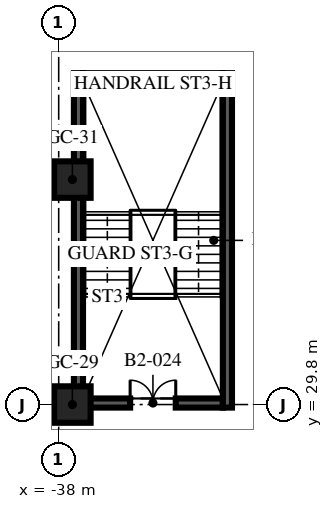
"""IFC4 building model, lengths in metres.
Left out: names, types, materials, properties, quantities, classifications, styles, units other than length and angle.
Written with IfcOpenShell. Run it as: python <this file> out.ifc"""

import sys

from ifc_helpers import new_model, si_unit, direction, frame, frame_2d, origin, origin_2d, place, context, subcontext, project, spatial, rectangle, extrude, element, fill, save


model = new_model("IFC4")
c1 = context("Model", 3, precision=1e-05, world=origin(), true_north=direction((0.0, 1.0)))
c2 = subcontext(c1, "Body", "Model", "MODEL_VIEW")
j1 = project(units=[si_unit("LENGTHUNIT", "METRE"), si_unit("PLANEANGLEUNIT", "RADIAN")], contexts=[c1])
p1 = place(None, origin())
s1 = spatial("IfcSite", under=j1, at=p1, CompositionType="ELEMENT")
p2 = place(p1, origin())
s2 = spatial("IfcBuilding", under=s1, at=p2, CompositionType="ELEMENT")
p3 = place(p2, frame((0.0, 0.0, -9.0)))
s3 = spatial("IfcBuildingStorey", under=s2, at=p3, CompositionType="ELEMENT", Elevation=-9.0)
for number, where, z_axis, x_axis in (
    (1, (-37.55, 29.8, 0.0), (0.0, 0.0, 1.0), (1.0, 0.0, 0.0)),
    (2, (-37.55, 37.2, 0.0), (0.0, 0.0, 1.0), (1.0, 0.0, 0.0)),
):
    element("IfcColumn", number, at=place(p3, frame(where, z_axis=z_axis, x_axis=x_axis)), inside=s3, PredefinedType="COLUMN", context=c2, shape_type="SweptSolid", body=[
        extrude(rectangle(XDim=1.2, YDim=1.2, at=origin_2d()), origin(), (0.0, 0.0, 1.0), 3.6),
    ])
p4 = place(p3, frame((-37.35, 29.7, 0.0), z_axis=(0.0, 0.0, 1.0), x_axis=(0.0, 1.0, 0.0)))
e3 = element("IfcWall", 3, at=p4, inside=s3, PredefinedType="SOLIDWALL", context=c2, shape_type="SweptSolid", body=[
    extrude(rectangle(XDim=11.0, YDim=0.3, at=frame_2d((5.5, 0.0))), origin(), (0.0, 0.0, 1.0), 3.3),
])
p5 = place(p3, frame((-37.2, 29.85, 0.0), z_axis=(0.0, 0.0, 1.0), x_axis=(1.0, 0.0, 0.0)))
e4 = element("IfcWall", 4, at=p5, inside=s3, PredefinedType="SOLIDWALL", context=c2, shape_type="SweptSolid", body=[
    extrude(rectangle(XDim=4.6, YDim=0.3, at=frame_2d((2.3, 0.0))), origin(), (0.0, 0.0, 1.0), 3.3),
])
p6 = place(p5, frame((1.55, 0.0, 0.0)))
e5 = element("IfcOpeningElement", 5, at=p6, cuts=e4, PredefinedType="OPENING", context=c2, shape_type="SweptSolid", body=[
    extrude(rectangle(XDim=1.5, YDim=2.1, at=frame_2d((0.75, 1.05))), frame((0.0, 0.16, 0.0), z_axis=(0.0, -1.0, 0.0), x_axis=(1.0, 0.0, 0.0)), (0.0, 0.0, 1.0), 0.32),
])
p7 = place(p3, frame((-32.45, 29.7, 0.0), z_axis=(0.0, 0.0, 1.0), x_axis=(0.0, 1.0, 0.0)))
e6 = element("IfcWall", 6, at=p7, inside=s3, PredefinedType="SOLIDWALL", context=c2, shape_type="SweptSolid", body=[
    extrude(rectangle(XDim=11.0, YDim=0.3, at=frame_2d((5.5, 0.0))), origin(), (0.0, 0.0, 1.0), 3.3),
])
p8 = place(p3, frame((-37.2, 40.55, 0.0), z_axis=(0.0, 0.0, 1.0), x_axis=(1.0, 0.0, 0.0)))
e7 = element("IfcWall", 7, at=p8, inside=s3, PredefinedType="SOLIDWALL", context=c2, shape_type="SweptSolid", body=[
    extrude(rectangle(XDim=4.6, YDim=0.3, at=frame_2d((2.3, 0.0))), origin(), (0.0, 0.0, 1.0), 3.3),
])
p9 = place(p6, origin())
e8 = element("IfcDoor", 8, at=p9, inside=s3, OperationType="DOUBLE_DOOR_SINGLE_SWING", PredefinedType="DOOR", context=c2, shape_type="SweptSolid", body=[
    extrude(rectangle(XDim=1.5, YDim=2.1, at=frame_2d((0.75, 1.05))), frame((0.0, 0.025, 0.0), z_axis=(0.0, -1.0, 0.0), x_axis=(1.0, 0.0, 0.0)), (0.0, 0.0, 1.0), 0.05),
])
fill(e5, e8)
save(model, sys.argv[1])
